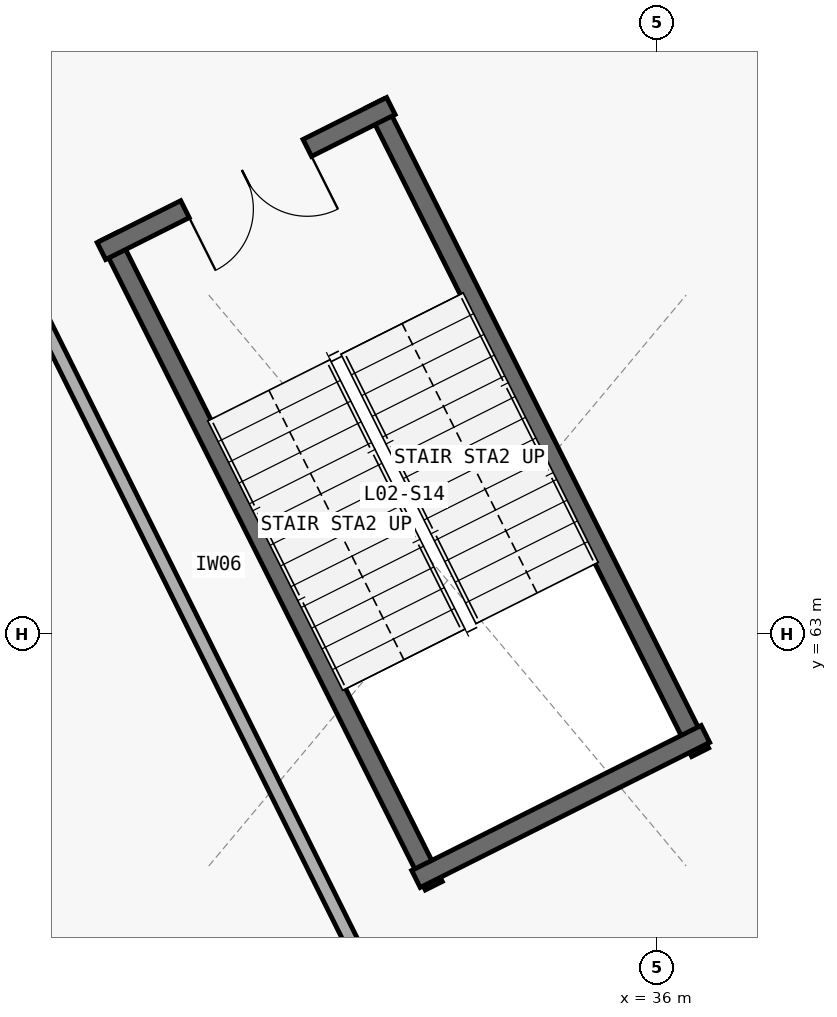
"""IFC4 building model, lengths in metres.
Left out: names, types, materials, properties, quantities, classifications, styles, units other than length and angle.
Written with IfcOpenShell. Run it as: python <this file> out.ifc"""

import sys

from ifc_helpers import new_model, si_unit, direction, frame, frame_2d, origin, place, context, subcontext, project, spatial, rectangle, extrude, element, fill, save


model = new_model("IFC4")
c1 = context("Model", 3, precision=1e-05, world=origin(), true_north=direction((0.0, 1.0)))
c2 = subcontext(c1, "Body", "Model", "MODEL_VIEW")
j1 = project(units=[si_unit("LENGTHUNIT", "METRE"), si_unit("PLANEANGLEUNIT", "RADIAN")], contexts=[c1])
p1 = place(None, origin())
s1 = spatial("IfcSite", under=j1, at=p1, CompositionType="ELEMENT")
p2 = place(p1, origin())
s2 = spatial("IfcBuilding", under=s1, at=p2, CompositionType="ELEMENT")
p3 = place(p2, frame((0.0, 0.0, 10.2)))
s3 = spatial("IfcBuildingStorey", under=s2, at=p3, CompositionType="ELEMENT", Elevation=10.2)
for number, where, z_axis, x_axis in (
    (1, (28.785, 68.226, 0.0), (0.0, 0.0, 1.0), (0.448, -0.894, 0.0)),
    (2, (36.568, 61.443, 0.0), (0.0, 0.0, 1.0), (-0.448, 0.894, 0.0)),
):
    element("IfcWall", number, at=place(p3, frame(where, z_axis=z_axis, x_axis=x_axis)), inside=s3, PredefinedType="SHEAR", context=c2, shape_type="SweptSolid", body=[
        extrude(rectangle(XDim=9.55, YDim=0.25, at=frame_2d((4.775, 0.0))), origin(), (0.0, 0.0, 1.0), 4.5),
    ])
p4 = place(p3, frame((32.498, 69.946, 0.0), z_axis=(0.0, 0.0, 1.0), x_axis=(-0.89409454548, -0.447878268888, 0.0)))
e3 = element("IfcWall", 3, at=p4, inside=s3, PredefinedType="SHEAR", context=c2, shape_type="SweptSolid", body=[
    extrude(rectangle(XDim=4.26, YDim=0.25, at=frame_2d((2.13, 0.0))), origin(), (0.0, 0.0, 1.0), 4.5),
])
p5 = place(p4, frame((1.23, 0.0, 0.0)))
e4 = element("IfcOpeningElement", 4, at=p5, cuts=e3, PredefinedType="OPENING", context=c2, shape_type="SweptSolid", body=[
    extrude(rectangle(XDim=1.8, YDim=2.25, at=frame_2d((0.9, 1.125))), frame((0.0, 0.135, 0.0), z_axis=(0.0, -1.0, 0.0), x_axis=(1.0, 0.0, 0.0)), (0.0, 0.0, 1.0), 0.27),
])
p6 = place(p3, frame((32.828, 59.777, 0.0), z_axis=(0.0, 0.0, 1.0), x_axis=(0.89409454548, 0.447878268888, 0.0)))
e5 = element("IfcWall", 5, at=p6, inside=s3, PredefinedType="SHEAR", context=c2, shape_type="SweptSolid", body=[
    extrude(rectangle(XDim=4.26, YDim=0.25, at=frame_2d((2.13, 0.0))), origin(), (0.0, 0.0, 1.0), 4.5),
])
p7 = place(p3, frame((25.384, 72.215, 0.0), z_axis=(0.0, 0.0, 1.0), x_axis=(0.445193759993, -0.895434261162, 0.0)))
e6 = element("IfcWall", 6, at=p7, inside=s3, PredefinedType="PARTITIONING", context=c2, shape_type="SweptSolid", body=[
    extrude(rectangle(XDim=19.205, YDim=0.18, at=frame_2d((9.603, 0.0))), origin(), (0.0, 0.0, 1.0), 3.565),
])
p8 = place(p5, origin())
e7 = element("IfcDoor", 7, at=p8, inside=s3, OperationType="DOUBLE_DOOR_SINGLE_SWING", PredefinedType="DOOR", context=c2, shape_type="SweptSolid", body=[
    extrude(rectangle(XDim=1.8, YDim=2.25, at=frame_2d((0.9, 1.125))), frame((0.0, 0.025, 0.0), z_axis=(0.0, -1.0, 0.0), x_axis=(1.0, 0.0, 0.0)), (0.0, 0.0, 1.0), 0.05),
])
fill(e4, e7)
save(model, sys.argv[1])
